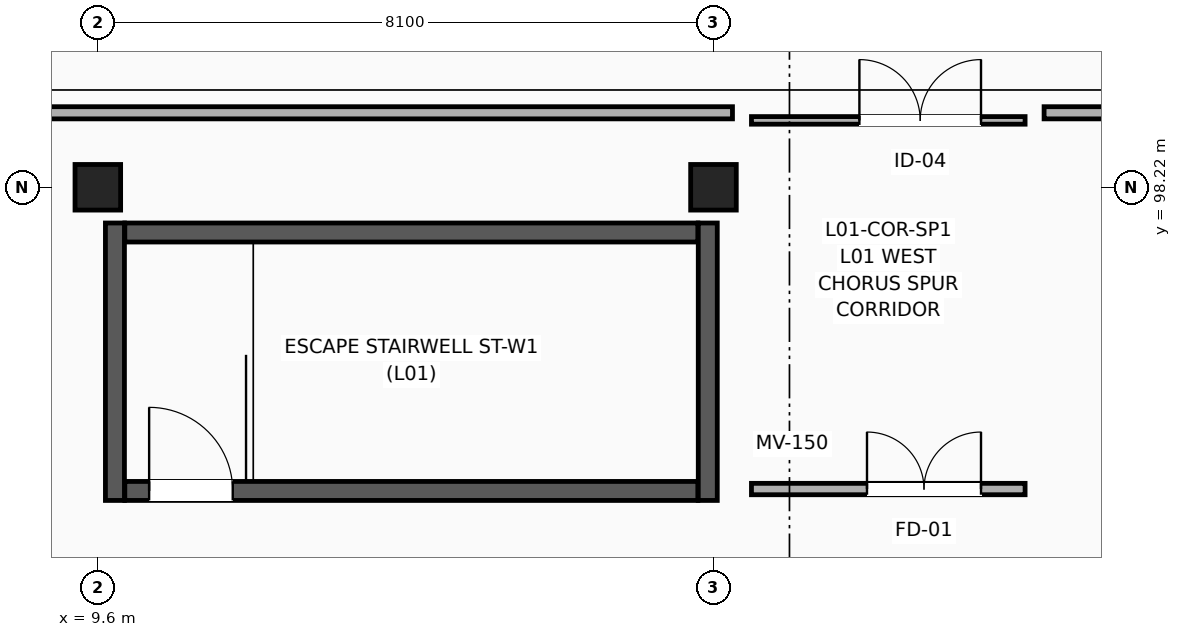
"""IFC4 building model, lengths in metres.
Left out: names, types, materials, properties, quantities, classifications, styles, units other than length and angle.
Written with IfcOpenShell. Run it as: python <this file> out.ifc"""

import sys

from ifc_helpers import new_model, si_unit, direction, frame, frame_2d, origin, origin_2d, place, context, subcontext, project, spatial, rectangle, extrude, element, fill, save


model = new_model("IFC4")
c1 = context("Model", 3, precision=1e-05, world=origin(), true_north=direction((0.0, 1.0)))
c2 = subcontext(c1, "Body", "Model", "MODEL_VIEW")
j1 = project(units=[si_unit("LENGTHUNIT", "METRE"), si_unit("PLANEANGLEUNIT", "RADIAN")], contexts=[c1])
p1 = place(None, origin())
s1 = spatial("IfcSite", under=j1, at=p1, CompositionType="ELEMENT")
p2 = place(p1, origin())
s2 = spatial("IfcBuilding", under=s1, at=p2, CompositionType="ELEMENT")
p3 = place(p2, frame((0.0, 0.0, 5.4)))
s3 = spatial("IfcBuildingStorey", under=s2, at=p3, CompositionType="ELEMENT", Elevation=5.4)
for number, where, z_axis, x_axis in (
    (1, (9.6, 98.22, 0.0), (0.0, 0.0, 1.0), (1.0, 0.0, 0.0)),
    (2, (17.7, 98.22, 0.0), (0.0, 0.0, 1.0), (1.0, 0.0, 0.0)),
):
    element("IfcColumn", number, at=place(p3, frame(where, z_axis=z_axis, x_axis=x_axis)), inside=s3, PredefinedType="COLUMN", context=c2, shape_type="SweptSolid", body=[
        extrude(rectangle(XDim=0.6, YDim=0.6, at=origin_2d()), origin(), (0.0, 0.0, 1.0), 4.8),
    ])
p4 = place(p3, frame((9.955, 94.225, 0.0), z_axis=(0.0, 0.0, 1.0), x_axis=(1.0, 0.0, 0.0)))
e3 = element("IfcWall", 3, at=p4, inside=s3, PredefinedType="SHEAR", context=c2, shape_type="SweptSolid", body=[
    extrude(rectangle(XDim=7.54, YDim=0.25, at=frame_2d((3.77, 0.0))), origin(), (0.0, 0.0, 1.0), 4.525),
])
p5 = place(p4, frame((0.32, 0.0, 0.0)))
e4 = element("IfcOpeningElement", 4, at=p5, cuts=e3, PredefinedType="OPENING", context=c2, shape_type="SweptSolid", body=[
    extrude(rectangle(XDim=1.1, YDim=2.2, at=frame_2d((0.55, 1.1))), frame((0.0, 0.135, 0.0), z_axis=(0.0, -1.0, 0.0), x_axis=(1.0, 0.0, 0.0)), (0.0, 0.0, 1.0), 0.27),
])
p6 = place(p3, frame((9.955, 97.625, 0.0), z_axis=(0.0, 0.0, 1.0), x_axis=(1.0, 0.0, 0.0)))
e5 = element("IfcWall", 5, at=p6, inside=s3, PredefinedType="SHEAR", context=c2, shape_type="SweptSolid", body=[
    extrude(rectangle(XDim=7.54, YDim=0.25, at=frame_2d((3.77, 0.0))), origin(), (0.0, 0.0, 1.0), 4.525),
])
for number, where, z_axis, x_axis in (
    (6, (9.825, 94.1, 0.0), (0.0, 0.0, 1.0), (0.0, 1.0, 0.0)),
    (7, (17.625, 94.1, 0.0), (0.0, 0.0, 1.0), (0.0, 1.0, 0.0)),
):
    element("IfcWall", number, at=place(p3, frame(where, z_axis=z_axis, x_axis=x_axis)), inside=s3, PredefinedType="SHEAR", context=c2, shape_type="SweptSolid", body=[
        extrude(rectangle(XDim=3.65, YDim=0.25, at=frame_2d((1.825, 0.0))), origin(), (0.0, 0.0, 1.0), 4.525),
    ])
p7 = place(p3, frame((18.2, 94.25, 0.0), z_axis=(0.0, 0.0, 1.0), x_axis=(1.0, 0.0, 0.0)))
e8 = element("IfcWall", 8, at=p7, inside=s3, PredefinedType="MOVABLE", context=c2, shape_type="SweptSolid", body=[
    extrude(rectangle(XDim=3.6, YDim=0.15, at=frame_2d((1.8, 0.0))), origin(), (0.0, 0.0, 1.0), 4.217),
])
p8 = place(p7, frame((1.52, 0.0, 0.0)))
e9 = element("IfcOpeningElement", 9, at=p8, cuts=e8, PredefinedType="OPENING", context=c2, shape_type="SweptSolid", body=[
    extrude(rectangle(XDim=1.5, YDim=2.2, at=frame_2d((0.75, 1.1))), frame((0.0, 0.085, 0.0), z_axis=(0.0, -1.0, 0.0), x_axis=(1.0, 0.0, 0.0)), (0.0, 0.0, 1.0), 0.17),
])
p9 = place(p3, frame((18.2, 99.1, 0.0), z_axis=(0.0, 0.0, 1.0), x_axis=(1.0, 0.0, 0.0)))
e10 = element("IfcWall", 10, at=p9, inside=s3, PredefinedType="PARTITIONING", context=c2, shape_type="SweptSolid", body=[
    extrude(rectangle(XDim=3.6, YDim=0.1, at=frame_2d((1.8, 0.0))), origin(), (0.0, 0.0, 1.0), 4.187),
])
p10 = place(p9, frame((1.42, 0.0, 0.0)))
e11 = element("IfcOpeningElement", 11, at=p10, cuts=e10, PredefinedType="OPENING", context=c2, shape_type="SweptSolid", body=[
    extrude(rectangle(XDim=1.6, YDim=2.3, at=frame_2d((0.8, 1.15))), frame((0.0, 0.06, 0.0), z_axis=(0.0, -1.0, 0.0), x_axis=(1.0, 0.0, 0.0)), (0.0, 0.0, 1.0), 0.12),
])
p11 = place(p3, frame((2.0, 99.2, 0.0), z_axis=(0.0, 0.0, 1.0), x_axis=(1.0, 0.0, 0.0)))
e12 = element("IfcWall", 12, at=p11, inside=s3, PredefinedType="PARTITIONING", context=c2, shape_type="SweptSolid", body=[
    extrude(rectangle(XDim=15.95, YDim=0.16, at=frame_2d((7.975, 0.0))), origin(), (0.0, 0.0, 1.0), 3.837),
])
p12 = place(p3, frame((22.05, 99.2, 0.0), z_axis=(0.0, 0.0, 1.0), x_axis=(1.0, 0.0, 0.0)))
e13 = element("IfcWall", 13, at=p12, inside=s3, PredefinedType="PARTITIONING", context=c2, shape_type="SweptSolid", body=[
    extrude(rectangle(XDim=11.55, YDim=0.16, at=frame_2d((5.775, 0.0))), origin(), (0.0, 0.0, 1.0), 3.837),
])
p13 = place(p5, origin())
e14 = element("IfcDoor", 14, at=p13, inside=s3, OperationType="SINGLE_SWING_LEFT", PredefinedType="DOOR", context=c2, shape_type="SweptSolid", body=[
    extrude(rectangle(XDim=1.1, YDim=2.2, at=frame_2d((0.55, 1.1))), frame((0.0, 0.025, 0.0), z_axis=(0.0, -1.0, 0.0), x_axis=(1.0, 0.0, 0.0)), (0.0, 0.0, 1.0), 0.05),
])
fill(e4, e14)
p14 = place(p8, origin())
e15 = element("IfcDoor", 15, at=p14, inside=s3, OperationType="DOUBLE_DOOR_SINGLE_SWING", PredefinedType="DOOR", context=c2, shape_type="SweptSolid", body=[
    extrude(rectangle(XDim=1.5, YDim=2.2, at=frame_2d((0.75, 1.1))), frame((0.0, 0.025, 0.0), z_axis=(0.0, -1.0, 0.0), x_axis=(1.0, 0.0, 0.0)), (0.0, 0.0, 1.0), 0.05),
])
fill(e9, e15)
p15 = place(p10, origin())
e16 = element("IfcDoor", 16, at=p15, inside=s3, OperationType="DOUBLE_DOOR_SINGLE_SWING", PredefinedType="DOOR", context=c2, shape_type="SweptSolid", body=[
    extrude(rectangle(XDim=1.6, YDim=2.3, at=frame_2d((0.8, 1.15))), frame((0.0, 0.025, 0.0), z_axis=(0.0, -1.0, 0.0), x_axis=(1.0, 0.0, 0.0)), (0.0, 0.0, 1.0), 0.05),
])
fill(e11, e16)
save(model, sys.argv[1])
